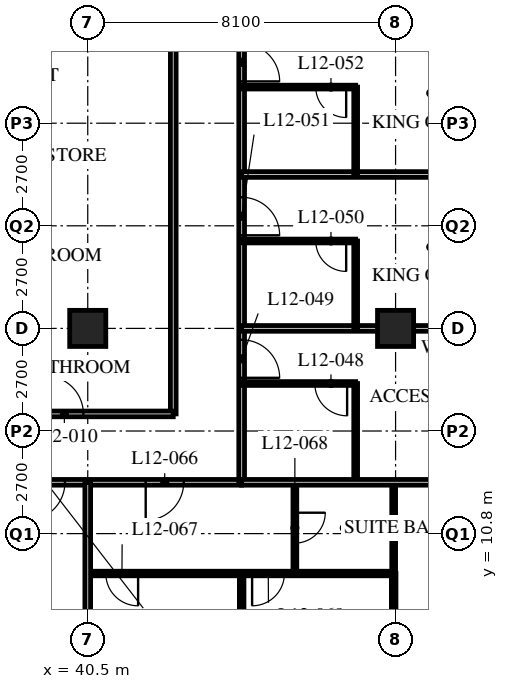
"""IFC4 building model, lengths in metres.
Left out: names, types, materials, properties, quantities, classifications, styles, units other than length and angle.
Written with IfcOpenShell. Run it as: python <this file> out.ifc"""

import sys

from ifc_helpers import new_model, si_unit, direction, frame, frame_2d, origin, origin_2d, place, context, subcontext, project, spatial, rectangle, hollow_rectangle, extrude, element, fill, save


model = new_model("IFC4")
c1 = context("Model", 3, precision=1e-05, world=origin(), true_north=direction((0.0, 1.0)))
c2 = subcontext(c1, "Body", "Model", "MODEL_VIEW")
j1 = project(units=[si_unit("LENGTHUNIT", "METRE"), si_unit("PLANEANGLEUNIT", "RADIAN")], contexts=[c1])
p1 = place(None, origin())
s1 = spatial("IfcSite", under=j1, at=p1, CompositionType="ELEMENT")
p2 = place(p1, origin())
s2 = spatial("IfcBuilding", under=s1, at=p2, CompositionType="ELEMENT")
p3 = place(p2, frame((0.0, 0.0, 53.4)))
s3 = spatial("IfcBuildingStorey", under=s2, at=p3, CompositionType="ELEMENT", Elevation=53.4)
for number, where, z_axis, x_axis in (
    (1, (40.5, 16.2, 0.0), (0.0, 0.0, 1.0), (1.0, 0.0, 0.0)),
    (2, (48.6, 16.2, 0.0), (0.0, 0.0, 1.0), (1.0, 0.0, 0.0)),
):
    element("IfcColumn", number, at=place(p3, frame(where, z_axis=z_axis, x_axis=x_axis)), inside=s3, PredefinedType="COLUMN", context=c2, shape_type="SweptSolid", body=[
        extrude(hollow_rectangle(XDim=0.95, YDim=0.95, WallThickness=0.095, at=origin_2d()), origin(), (0.0, 0.0, 1.0), 3.4),
    ])
p4 = place(p3, frame((12.15, 12.15, 0.0), z_axis=(0.0, 0.0, 1.0), x_axis=(1.0, 0.0, 0.0)))
e3 = element("IfcWall", 3, at=p4, inside=s3, PredefinedType="PARTITIONING", context=c2, shape_type="SweptSolid", body=[
    extrude(rectangle(XDim=32.4, YDim=0.15, at=frame_2d((16.2, 0.0))), origin(), (0.0, 0.0, 1.0), 3.19),
])
p5 = place(p4, frame((6.5, 0.0, 0.0)))
e4 = element("IfcOpeningElement", 4, at=p5, cuts=e3, PredefinedType="OPENING", context=c2, shape_type="SweptSolid", body=[
    extrude(rectangle(XDim=1.0, YDim=2.1, at=frame_2d((0.5, 1.05))), frame((0.0, 0.085, 0.0), z_axis=(0.0, -1.0, 0.0), x_axis=(1.0, 0.0, 0.0)), (0.0, 0.0, 1.0), 0.17),
])
p6 = place(p4, frame((8.4, 0.0, 0.0)))
e5 = element("IfcOpeningElement", 5, at=p6, cuts=e3, PredefinedType="OPENING", context=c2, shape_type="SweptSolid", body=[
    extrude(rectangle(XDim=1.0, YDim=2.1, at=frame_2d((0.5, 1.05))), frame((0.0, 0.085, 0.0), z_axis=(0.0, -1.0, 0.0), x_axis=(1.0, 0.0, 0.0)), (0.0, 0.0, 1.0), 0.17),
])
p7 = place(p4, frame((14.6, 0.0, 0.0)))
e6 = element("IfcOpeningElement", 6, at=p7, cuts=e3, PredefinedType="OPENING", context=c2, shape_type="SweptSolid", body=[
    extrude(rectangle(XDim=1.0, YDim=2.1, at=frame_2d((0.5, 1.05))), frame((0.0, 0.085, 0.0), z_axis=(0.0, -1.0, 0.0), x_axis=(1.0, 0.0, 0.0)), (0.0, 0.0, 1.0), 0.17),
])
p8 = place(p4, frame((18.65, 0.0, 0.0)))
e7 = element("IfcOpeningElement", 7, at=p8, cuts=e3, PredefinedType="OPENING", context=c2, shape_type="SweptSolid", body=[
    extrude(rectangle(XDim=1.0, YDim=2.1, at=frame_2d((0.5, 1.05))), frame((0.0, 0.085, 0.0), z_axis=(0.0, -1.0, 0.0), x_axis=(1.0, 0.0, 0.0)), (0.0, 0.0, 1.0), 0.17),
])
p9 = place(p4, frame((20.55, 0.0, 0.0)))
e8 = element("IfcOpeningElement", 8, at=p9, cuts=e3, PredefinedType="OPENING", context=c2, shape_type="SweptSolid", body=[
    extrude(rectangle(XDim=1.0, YDim=2.1, at=frame_2d((0.5, 1.05))), frame((0.0, 0.085, 0.0), z_axis=(0.0, -1.0, 0.0), x_axis=(1.0, 0.0, 0.0)), (0.0, 0.0, 1.0), 0.17),
])
p10 = place(p4, frame((26.75, 0.0, 0.0)))
e9 = element("IfcOpeningElement", 9, at=p10, cuts=e3, PredefinedType="OPENING", context=c2, shape_type="SweptSolid", body=[
    extrude(rectangle(XDim=1.0, YDim=2.1, at=frame_2d((0.5, 1.05))), frame((0.0, 0.085, 0.0), z_axis=(0.0, -1.0, 0.0), x_axis=(1.0, 0.0, 0.0)), (0.0, 0.0, 1.0), 0.17),
])
p11 = place(p4, frame((1.525, 0.0, 0.0)))
e10 = element("IfcOpeningElement", 10, at=p11, cuts=e3, PredefinedType="OPENING", context=c2, shape_type="SweptSolid", body=[
    extrude(rectangle(XDim=1.0, YDim=2.1, at=frame_2d((0.5, 1.05))), frame((0.0, 0.085, 0.0), z_axis=(0.0, -1.0, 0.0), x_axis=(1.0, 0.0, 0.0)), (0.0, 0.0, 1.0), 0.17),
])
p12 = place(p4, frame((29.875, 0.0, 0.0)))
e11 = element("IfcOpeningElement", 11, at=p12, cuts=e3, PredefinedType="OPENING", context=c2, shape_type="SweptSolid", body=[
    extrude(rectangle(XDim=1.0, YDim=2.1, at=frame_2d((0.5, 1.05))), frame((0.0, 0.085, 0.0), z_axis=(0.0, -1.0, 0.0), x_axis=(1.0, 0.0, 0.0)), (0.0, 0.0, 1.0), 0.17),
])
p13 = place(p3, frame((44.55, 12.15, 0.0), z_axis=(0.0, 0.0, 1.0), x_axis=(0.0, 1.0, 0.0)))
e12 = element("IfcWall", 12, at=p13, inside=s3, PredefinedType="PARTITIONING", context=c2, shape_type="SweptSolid", body=[
    extrude(rectangle(XDim=30.15, YDim=0.15, at=frame_2d((15.075, 0.0))), origin(), (0.0, 0.0, 1.0), 3.19),
])
p14 = place(p13, frame((2.75, 0.0, 0.0)))
e13 = element("IfcOpeningElement", 13, at=p14, cuts=e12, PredefinedType="OPENING", context=c2, shape_type="SweptSolid", body=[
    extrude(rectangle(XDim=1.0, YDim=2.1, at=frame_2d((0.5, 1.05))), frame((0.0, 0.085, 0.0), z_axis=(0.0, -1.0, 0.0), x_axis=(1.0, 0.0, 0.0)), (0.0, 0.0, 1.0), 0.17),
])
p15 = place(p13, frame((6.5, 0.0, 0.0)))
e14 = element("IfcOpeningElement", 14, at=p15, cuts=e12, PredefinedType="OPENING", context=c2, shape_type="SweptSolid", body=[
    extrude(rectangle(XDim=1.0, YDim=2.1, at=frame_2d((0.5, 1.05))), frame((0.0, 0.085, 0.0), z_axis=(0.0, -1.0, 0.0), x_axis=(1.0, 0.0, 0.0)), (0.0, 0.0, 1.0), 0.17),
])
p16 = place(p13, frame((10.55, 0.0, 0.0)))
e15 = element("IfcOpeningElement", 15, at=p16, cuts=e12, PredefinedType="OPENING", context=c2, shape_type="SweptSolid", body=[
    extrude(rectangle(XDim=1.0, YDim=2.1, at=frame_2d((0.5, 1.05))), frame((0.0, 0.085, 0.0), z_axis=(0.0, -1.0, 0.0), x_axis=(1.0, 0.0, 0.0)), (0.0, 0.0, 1.0), 0.17),
])
p17 = place(p13, frame((14.6, 0.0, 0.0)))
e16 = element("IfcOpeningElement", 16, at=p17, cuts=e12, PredefinedType="OPENING", context=c2, shape_type="SweptSolid", body=[
    extrude(rectangle(XDim=1.0, YDim=2.1, at=frame_2d((0.5, 1.05))), frame((0.0, 0.085, 0.0), z_axis=(0.0, -1.0, 0.0), x_axis=(1.0, 0.0, 0.0)), (0.0, 0.0, 1.0), 0.17),
])
p18 = place(p13, frame((18.65, 0.0, 0.0)))
e17 = element("IfcOpeningElement", 17, at=p18, cuts=e12, PredefinedType="OPENING", context=c2, shape_type="SweptSolid", body=[
    extrude(rectangle(XDim=1.0, YDim=2.1, at=frame_2d((0.5, 1.05))), frame((0.0, 0.085, 0.0), z_axis=(0.0, -1.0, 0.0), x_axis=(1.0, 0.0, 0.0)), (0.0, 0.0, 1.0), 0.17),
])
p19 = place(p13, frame((22.7, 0.0, 0.0)))
e18 = element("IfcOpeningElement", 18, at=p19, cuts=e12, PredefinedType="OPENING", context=c2, shape_type="SweptSolid", body=[
    extrude(rectangle(XDim=1.0, YDim=2.1, at=frame_2d((0.5, 1.05))), frame((0.0, 0.085, 0.0), z_axis=(0.0, -1.0, 0.0), x_axis=(1.0, 0.0, 0.0)), (0.0, 0.0, 1.0), 0.17),
])
p20 = place(p13, frame((26.7, 0.0, 0.0)))
e19 = element("IfcOpeningElement", 19, at=p20, cuts=e12, PredefinedType="OPENING", context=c2, shape_type="SweptSolid", body=[
    extrude(rectangle(XDim=1.0, YDim=2.1, at=frame_2d((0.5, 1.05))), frame((0.0, 0.085, 0.0), z_axis=(0.0, -1.0, 0.0), x_axis=(1.0, 0.0, 0.0)), (0.0, 0.0, 1.0), 0.17),
])
p21 = place(p3, frame((42.75, 13.95, 0.0), z_axis=(0.0, 0.0, 1.0), x_axis=(0.0, 1.0, 0.0)))
e20 = element("IfcWall", 20, at=p21, inside=s3, PredefinedType="PARTITIONING", context=c2, shape_type="SweptSolid", body=[
    extrude(rectangle(XDim=26.55, YDim=0.15, at=frame_2d((13.275, 0.0))), origin(), (0.0, 0.0, 1.0), 3.19),
])
p22 = place(p21, frame((13.9, 0.0, 0.0)))
e21 = element("IfcOpeningElement", 21, at=p22, cuts=e20, PredefinedType="OPENING", context=c2, shape_type="SweptSolid", body=[
    extrude(rectangle(XDim=1.0, YDim=2.1, at=frame_2d((0.5, 1.05))), frame((0.0, 0.085, 0.0), z_axis=(0.0, -1.0, 0.0), x_axis=(1.0, 0.0, 0.0)), (0.0, 0.0, 1.0), 0.17),
])
p23 = place(p21, frame((22.0, 0.0, 0.0)))
e22 = element("IfcOpeningElement", 22, at=p23, cuts=e20, PredefinedType="OPENING", context=c2, shape_type="SweptSolid", body=[
    extrude(rectangle(XDim=1.0, YDim=2.1, at=frame_2d((0.5, 1.05))), frame((0.0, 0.085, 0.0), z_axis=(0.0, -1.0, 0.0), x_axis=(1.0, 0.0, 0.0)), (0.0, 0.0, 1.0), 0.17),
])
p24 = place(p3, frame((29.56, 13.95, 0.0), z_axis=(0.0, 0.0, 1.0), x_axis=(1.0, 0.0, 0.0)))
e23 = element("IfcWall", 23, at=p24, inside=s3, PredefinedType="PARTITIONING", context=c2, shape_type="SweptSolid", body=[
    extrude(rectangle(XDim=13.19, YDim=0.15, at=frame_2d((6.595, 0.0))), origin(), (0.0, 0.0, 1.0), 3.19),
])
p25 = place(p24, frame((0.36, 0.0, 0.0)))
e24 = element("IfcOpeningElement", 24, at=p25, cuts=e23, PredefinedType="OPENING", context=c2, shape_type="SweptSolid", body=[
    extrude(rectangle(XDim=1.0, YDim=2.1, at=frame_2d((0.5, 1.05))), frame((0.0, 0.085, 0.0), z_axis=(0.0, -1.0, 0.0), x_axis=(1.0, 0.0, 0.0)), (0.0, 0.0, 1.0), 0.17),
])
p26 = place(p24, frame((4.094, 0.0, 0.0)))
e25 = element("IfcOpeningElement", 25, at=p26, cuts=e23, PredefinedType="OPENING", context=c2, shape_type="SweptSolid", body=[
    extrude(rectangle(XDim=1.0, YDim=2.1, at=frame_2d((0.5, 1.05))), frame((0.0, 0.085, 0.0), z_axis=(0.0, -1.0, 0.0), x_axis=(1.0, 0.0, 0.0)), (0.0, 0.0, 1.0), 0.17),
])
p27 = place(p24, frame((9.825, 0.0, 0.0)))
e26 = element("IfcOpeningElement", 26, at=p27, cuts=e23, PredefinedType="OPENING", context=c2, shape_type="SweptSolid", body=[
    extrude(rectangle(XDim=1.0, YDim=2.1, at=frame_2d((0.5, 1.05))), frame((0.0, 0.085, 0.0), z_axis=(0.0, -1.0, 0.0), x_axis=(1.0, 0.0, 0.0)), (0.0, 0.0, 1.0), 0.17),
])
p28 = place(p3, frame((47.55, 12.15, 0.0), z_axis=(0.0, 0.0, 1.0), x_axis=(0.0, 1.0, 0.0)))
e27 = element("IfcWall", 27, at=p28, inside=s3, PredefinedType="PARTITIONING", context=c2, shape_type="SweptSolid", body=[
    extrude(rectangle(XDim=2.6, YDim=0.1, at=frame_2d((1.3, 0.0))), origin(), (0.0, 0.0, 1.0), 3.19),
])
p29 = place(p3, frame((44.55, 14.75, 0.0), z_axis=(0.0, 0.0, 1.0), x_axis=(1.0, 0.0, 0.0)))
e28 = element("IfcWall", 28, at=p29, inside=s3, PredefinedType="PARTITIONING", context=c2, shape_type="SweptSolid", body=[
    extrude(rectangle(XDim=3.0, YDim=0.1, at=frame_2d((1.5, 0.0))), origin(), (0.0, 0.0, 1.0), 3.19),
])
p30 = place(p29, frame((1.925, 0.0, 0.0)))
e29 = element("IfcOpeningElement", 29, at=p30, cuts=e28, PredefinedType="OPENING", context=c2, shape_type="SweptSolid", body=[
    extrude(rectangle(XDim=0.85, YDim=2.1, at=frame_2d((0.425, 1.05))), frame((0.0, 0.06, 0.0), z_axis=(0.0, -1.0, 0.0), x_axis=(1.0, 0.0, 0.0)), (0.0, 0.0, 1.0), 0.12),
])
p31 = place(p3, frame((44.55, 16.2, 0.0), z_axis=(0.0, 0.0, 1.0), x_axis=(1.0, 0.0, 0.0)))
e30 = element("IfcWall", 30, at=p31, inside=s3, PredefinedType="PARTITIONING", context=c2, shape_type="SweptSolid", body=[
    extrude(rectangle(XDim=11.85, YDim=0.15, at=frame_2d((5.925, 0.0))), origin(), (0.0, 0.0, 1.0), 2.578),
])
p32 = place(p3, frame((47.55, 16.2, 0.0), z_axis=(0.0, 0.0, 1.0), x_axis=(0.0, 1.0, 0.0)))
e31 = element("IfcWall", 31, at=p32, inside=s3, PredefinedType="PARTITIONING", context=c2, shape_type="SweptSolid", body=[
    extrude(rectangle(XDim=2.3, YDim=0.1, at=frame_2d((1.15, 0.0))), origin(), (0.0, 0.0, 1.0), 3.19),
])
p33 = place(p3, frame((44.55, 18.5, 0.0), z_axis=(0.0, 0.0, 1.0), x_axis=(1.0, 0.0, 0.0)))
e32 = element("IfcWall", 32, at=p33, inside=s3, PredefinedType="PARTITIONING", context=c2, shape_type="SweptSolid", body=[
    extrude(rectangle(XDim=3.0, YDim=0.1, at=frame_2d((1.5, 0.0))), origin(), (0.0, 0.0, 1.0), 3.19),
])
p34 = place(p33, frame((1.95, 0.0, 0.0)))
e33 = element("IfcOpeningElement", 33, at=p34, cuts=e32, PredefinedType="OPENING", context=c2, shape_type="SweptSolid", body=[
    extrude(rectangle(XDim=0.8, YDim=2.1, at=frame_2d((0.4, 1.05))), frame((0.0, 0.06, 0.0), z_axis=(0.0, -1.0, 0.0), x_axis=(1.0, 0.0, 0.0)), (0.0, 0.0, 1.0), 0.12),
])
p35 = place(p3, frame((44.55, 20.25, 0.0), z_axis=(0.0, 0.0, 1.0), x_axis=(1.0, 0.0, 0.0)))
e34 = element("IfcWall", 34, at=p35, inside=s3, PredefinedType="PARTITIONING", context=c2, shape_type="SweptSolid", body=[
    extrude(rectangle(XDim=11.85, YDim=0.15, at=frame_2d((5.925, 0.0))), origin(), (0.0, 0.0, 1.0), 3.19),
])
p36 = place(p3, frame((47.55, 20.25, 0.0), z_axis=(0.0, 0.0, 1.0), x_axis=(0.0, 1.0, 0.0)))
e35 = element("IfcWall", 35, at=p36, inside=s3, PredefinedType="PARTITIONING", context=c2, shape_type="SweptSolid", body=[
    extrude(rectangle(XDim=2.3, YDim=0.1, at=frame_2d((1.15, 0.0))), origin(), (0.0, 0.0, 1.0), 3.19),
])
p37 = place(p3, frame((44.55, 22.55, 0.0), z_axis=(0.0, 0.0, 1.0), x_axis=(1.0, 0.0, 0.0)))
e36 = element("IfcWall", 36, at=p37, inside=s3, PredefinedType="PARTITIONING", context=c2, shape_type="SweptSolid", body=[
    extrude(rectangle(XDim=3.0, YDim=0.1, at=frame_2d((1.5, 0.0))), origin(), (0.0, 0.0, 1.0), 3.19),
])
p38 = place(p37, frame((1.95, 0.0, 0.0)))
e37 = element("IfcOpeningElement", 37, at=p38, cuts=e36, PredefinedType="OPENING", context=c2, shape_type="SweptSolid", body=[
    extrude(rectangle(XDim=0.8, YDim=2.1, at=frame_2d((0.4, 1.05))), frame((0.0, 0.06, 0.0), z_axis=(0.0, -1.0, 0.0), x_axis=(1.0, 0.0, 0.0)), (0.0, 0.0, 1.0), 0.12),
])
p39 = place(p3, frame((40.5, 9.75, 0.0), z_axis=(0.0, 0.0, 1.0), x_axis=(1.0, 0.0, 0.0)))
e38 = element("IfcWall", 38, at=p39, inside=s3, PredefinedType="PARTITIONING", context=c2, shape_type="SweptSolid", body=[
    extrude(rectangle(XDim=8.05, YDim=0.12, at=frame_2d((4.025, 0.0))), origin(), (0.0, 0.0, 1.0), 3.19),
])
p40 = place(p39, frame((0.475, 0.0, 0.0)))
e39 = element("IfcOpeningElement", 39, at=p40, cuts=e38, PredefinedType="OPENING", context=c2, shape_type="SweptSolid", body=[
    extrude(rectangle(XDim=0.85, YDim=2.1, at=frame_2d((0.425, 1.05))), frame((0.0, 0.07, 0.0), z_axis=(0.0, -1.0, 0.0), x_axis=(1.0, 0.0, 0.0)), (0.0, 0.0, 1.0), 0.14),
])
p41 = place(p39, frame((4.325, 0.0, 0.0)))
e40 = element("IfcOpeningElement", 40, at=p41, cuts=e38, PredefinedType="OPENING", context=c2, shape_type="SweptSolid", body=[
    extrude(rectangle(XDim=0.85, YDim=2.1, at=frame_2d((0.425, 1.05))), frame((0.0, 0.07, 0.0), z_axis=(0.0, -1.0, 0.0), x_axis=(1.0, 0.0, 0.0)), (0.0, 0.0, 1.0), 0.14),
])
p42 = place(p3, frame((45.95, 12.15, 0.0), z_axis=(0.0, 0.0, 1.0), x_axis=(0.0, -1.0, 0.0)))
e41 = element("IfcWall", 41, at=p42, inside=s3, PredefinedType="PARTITIONING", context=c2, shape_type="SweptSolid", body=[
    extrude(rectangle(XDim=2.4, YDim=0.1, at=frame_2d((1.2, 0.0))), origin(), (0.0, 0.0, 1.0), 3.19),
])
p43 = place(p42, frame((0.8, 0.0, 0.0)))
e42 = element("IfcOpeningElement", 42, at=p43, cuts=e41, PredefinedType="OPENING", context=c2, shape_type="SweptSolid", body=[
    extrude(rectangle(XDim=0.8, YDim=2.1, at=frame_2d((0.4, 1.05))), frame((0.0, 0.06, 0.0), z_axis=(0.0, -1.0, 0.0), x_axis=(1.0, 0.0, 0.0)), (0.0, 0.0, 1.0), 0.12),
])
p44 = place(p3, frame((48.55, 12.15, 0.0), z_axis=(0.0, 0.0, 1.0), x_axis=(0.0, -1.0, 0.0)))
e43 = element("IfcWall", 43, at=p44, inside=s3, PredefinedType="PARTITIONING", context=c2, shape_type="SweptSolid", body=[
    extrude(rectangle(XDim=2.4, YDim=0.1, at=frame_2d((1.2, 0.0))), origin(), (0.0, 0.0, 1.0), 2.578),
])
p45 = place(p3, frame((44.55, 9.75, 0.0), z_axis=(0.0, 0.0, 1.0), x_axis=(0.0, -1.0, 0.0)))
e44 = element("IfcWall", 44, at=p45, inside=s3, PredefinedType="PARTITIONING", context=c2, shape_type="SweptSolid", body=[
    extrude(rectangle(XDim=9.45, YDim=0.12, at=frame_2d((4.725, 0.0))), origin(), (0.0, 0.0, 1.0), 3.19),
])
p46 = place(p3, frame((44.55, 12.15, 0.0), z_axis=(0.0, 0.0, 1.0), x_axis=(1.0, 0.0, 0.0)))
e45 = element("IfcWall", 45, at=p46, inside=s3, PredefinedType="PARTITIONING", context=c2, shape_type="SweptSolid", body=[
    extrude(rectangle(XDim=11.85, YDim=0.15, at=frame_2d((5.925, 0.0))), origin(), (0.0, 0.0, 1.0), 3.19),
])
p47 = place(p3, frame((40.5, 12.15, 0.0), z_axis=(0.0, 0.0, 1.0), x_axis=(0.0, -1.0, 0.0)))
e46 = element("IfcWall", 46, at=p47, inside=s3, PredefinedType="PARTITIONING", context=c2, shape_type="SweptSolid", body=[
    extrude(rectangle(XDim=11.85, YDim=0.15, at=frame_2d((5.925, 0.0))), origin(), (0.0, 0.0, 1.0), 2.578),
])
p48 = place(p3, frame((48.55, 9.75, 0.0), z_axis=(0.0, 0.0, 1.0), x_axis=(0.0, -1.0, 0.0)))
e47 = element("IfcWall", 47, at=p48, inside=s3, PredefinedType="PARTITIONING", context=c2, shape_type="SweptSolid", body=[
    extrude(rectangle(XDim=1.175, YDim=0.12, at=frame_2d((0.587, 0.0))), origin(), (0.0, 0.0, 1.0), 2.578),
])
p49 = place(p27, origin())
e48 = element("IfcDoor", 48, at=p49, inside=s3, OperationType="SINGLE_SWING_LEFT", PredefinedType="DOOR", context=c2, shape_type="SweptSolid", body=[
    extrude(rectangle(XDim=1.0, YDim=2.1, at=frame_2d((0.5, 1.05))), frame((0.0, 0.025, 0.0), z_axis=(0.0, -1.0, 0.0), x_axis=(1.0, 0.0, 0.0)), (0.0, 0.0, 1.0), 0.05),
])
fill(e26, e48)
p50 = place(p10, origin())
e49 = element("IfcDoor", 49, at=p50, inside=s3, OperationType="SINGLE_SWING_RIGHT", PredefinedType="DOOR", context=c2, shape_type="SweptSolid", body=[
    extrude(rectangle(XDim=1.0, YDim=2.1, at=frame_2d((0.5, 1.05))), frame((0.0, 0.025, 0.0), z_axis=(0.0, -1.0, 0.0), x_axis=(1.0, 0.0, 0.0)), (0.0, 0.0, 1.0), 0.05),
])
fill(e9, e49)
p51 = place(p30, origin())
e50 = element("IfcDoor", 50, at=p51, inside=s3, OperationType="SINGLE_SWING_LEFT", PredefinedType="DOOR", context=c2, shape_type="SweptSolid", body=[
    extrude(rectangle(XDim=0.85, YDim=2.1, at=frame_2d((0.425, 1.05))), frame((0.0, 0.025, 0.0), z_axis=(0.0, -1.0, 0.0), x_axis=(1.0, 0.0, 0.0)), (0.0, 0.0, 1.0), 0.05),
])
fill(e29, e50)
p52 = place(p14, origin())
e51 = element("IfcDoor", 51, at=p52, inside=s3, OperationType="SINGLE_SWING_RIGHT", PredefinedType="DOOR", context=c2, shape_type="SweptSolid", body=[
    extrude(rectangle(XDim=1.0, YDim=2.1, at=frame_2d((0.5, 1.05))), frame((0.0, 0.025, 0.0), z_axis=(0.0, -1.0, 0.0), x_axis=(1.0, 0.0, 0.0)), (0.0, 0.0, 1.0), 0.05),
])
fill(e13, e51)
p53 = place(p34, origin())
e52 = element("IfcDoor", 52, at=p53, inside=s3, OperationType="SINGLE_SWING_LEFT", PredefinedType="DOOR", context=c2, shape_type="SweptSolid", body=[
    extrude(rectangle(XDim=0.8, YDim=2.1, at=frame_2d((0.4, 1.05))), frame((0.0, 0.025, 0.0), z_axis=(0.0, -1.0, 0.0), x_axis=(1.0, 0.0, 0.0)), (0.0, 0.0, 1.0), 0.05),
])
fill(e33, e52)
p54 = place(p15, origin())
e53 = element("IfcDoor", 53, at=p54, inside=s3, OperationType="SINGLE_SWING_RIGHT", PredefinedType="DOOR", context=c2, shape_type="SweptSolid", body=[
    extrude(rectangle(XDim=1.0, YDim=2.1, at=frame_2d((0.5, 1.05))), frame((0.0, 0.025, 0.0), z_axis=(0.0, -1.0, 0.0), x_axis=(1.0, 0.0, 0.0)), (0.0, 0.0, 1.0), 0.05),
])
fill(e14, e53)
p55 = place(p38, origin())
e54 = element("IfcDoor", 54, at=p55, inside=s3, OperationType="SINGLE_SWING_LEFT", PredefinedType="DOOR", context=c2, shape_type="SweptSolid", body=[
    extrude(rectangle(XDim=0.8, YDim=2.1, at=frame_2d((0.4, 1.05))), frame((0.0, 0.025, 0.0), z_axis=(0.0, -1.0, 0.0), x_axis=(1.0, 0.0, 0.0)), (0.0, 0.0, 1.0), 0.05),
])
fill(e37, e54)
p56 = place(p16, origin())
e55 = element("IfcDoor", 55, at=p56, inside=s3, OperationType="SINGLE_SWING_RIGHT", PredefinedType="DOOR", context=c2, shape_type="SweptSolid", body=[
    extrude(rectangle(XDim=1.0, YDim=2.1, at=frame_2d((0.5, 1.05))), frame((0.0, 0.025, 0.0), z_axis=(0.0, -1.0, 0.0), x_axis=(1.0, 0.0, 0.0)), (0.0, 0.0, 1.0), 0.05),
])
fill(e15, e55)
p57 = place(p12, origin())
e56 = element("IfcDoor", 56, at=p57, inside=s3, OperationType="SINGLE_SWING_RIGHT", PredefinedType="DOOR", context=c2, shape_type="SweptSolid", body=[
    extrude(rectangle(XDim=1.0, YDim=2.1, at=frame_2d((0.5, 1.05))), frame((0.0, 0.025, 0.0), z_axis=(0.0, -1.0, 0.0), x_axis=(1.0, 0.0, 0.0)), (0.0, 0.0, 1.0), 0.05),
])
fill(e11, e56)
p58 = place(p40, origin())
e57 = element("IfcDoor", 57, at=p58, inside=s3, OperationType="SINGLE_SWING_LEFT", PredefinedType="DOOR", context=c2, shape_type="SweptSolid", body=[
    extrude(rectangle(XDim=0.85, YDim=2.1, at=frame_2d((0.425, 1.05))), frame((0.0, 0.025, 0.0), z_axis=(0.0, -1.0, 0.0), x_axis=(1.0, 0.0, 0.0)), (0.0, 0.0, 1.0), 0.05),
])
fill(e39, e57)
p59 = place(p43, origin())
e58 = element("IfcDoor", 58, at=p59, inside=s3, OperationType="SINGLE_SWING_LEFT", PredefinedType="DOOR", context=c2, shape_type="SweptSolid", body=[
    extrude(rectangle(XDim=0.8, YDim=2.1, at=frame_2d((0.4, 1.05))), frame((0.0, 0.025, 0.0), z_axis=(0.0, -1.0, 0.0), x_axis=(1.0, 0.0, 0.0)), (0.0, 0.0, 1.0), 0.05),
])
fill(e42, e58)
p60 = place(p41, origin())
e59 = element("IfcDoor", 59, at=p60, inside=s3, OperationType="SINGLE_SWING_RIGHT", PredefinedType="DOOR", context=c2, shape_type="SweptSolid", body=[
    extrude(rectangle(XDim=0.85, YDim=2.1, at=frame_2d((0.425, 1.05))), frame((0.0, 0.025, 0.0), z_axis=(0.0, -1.0, 0.0), x_axis=(1.0, 0.0, 0.0)), (0.0, 0.0, 1.0), 0.05),
])
fill(e40, e59)
save(model, sys.argv[1])
